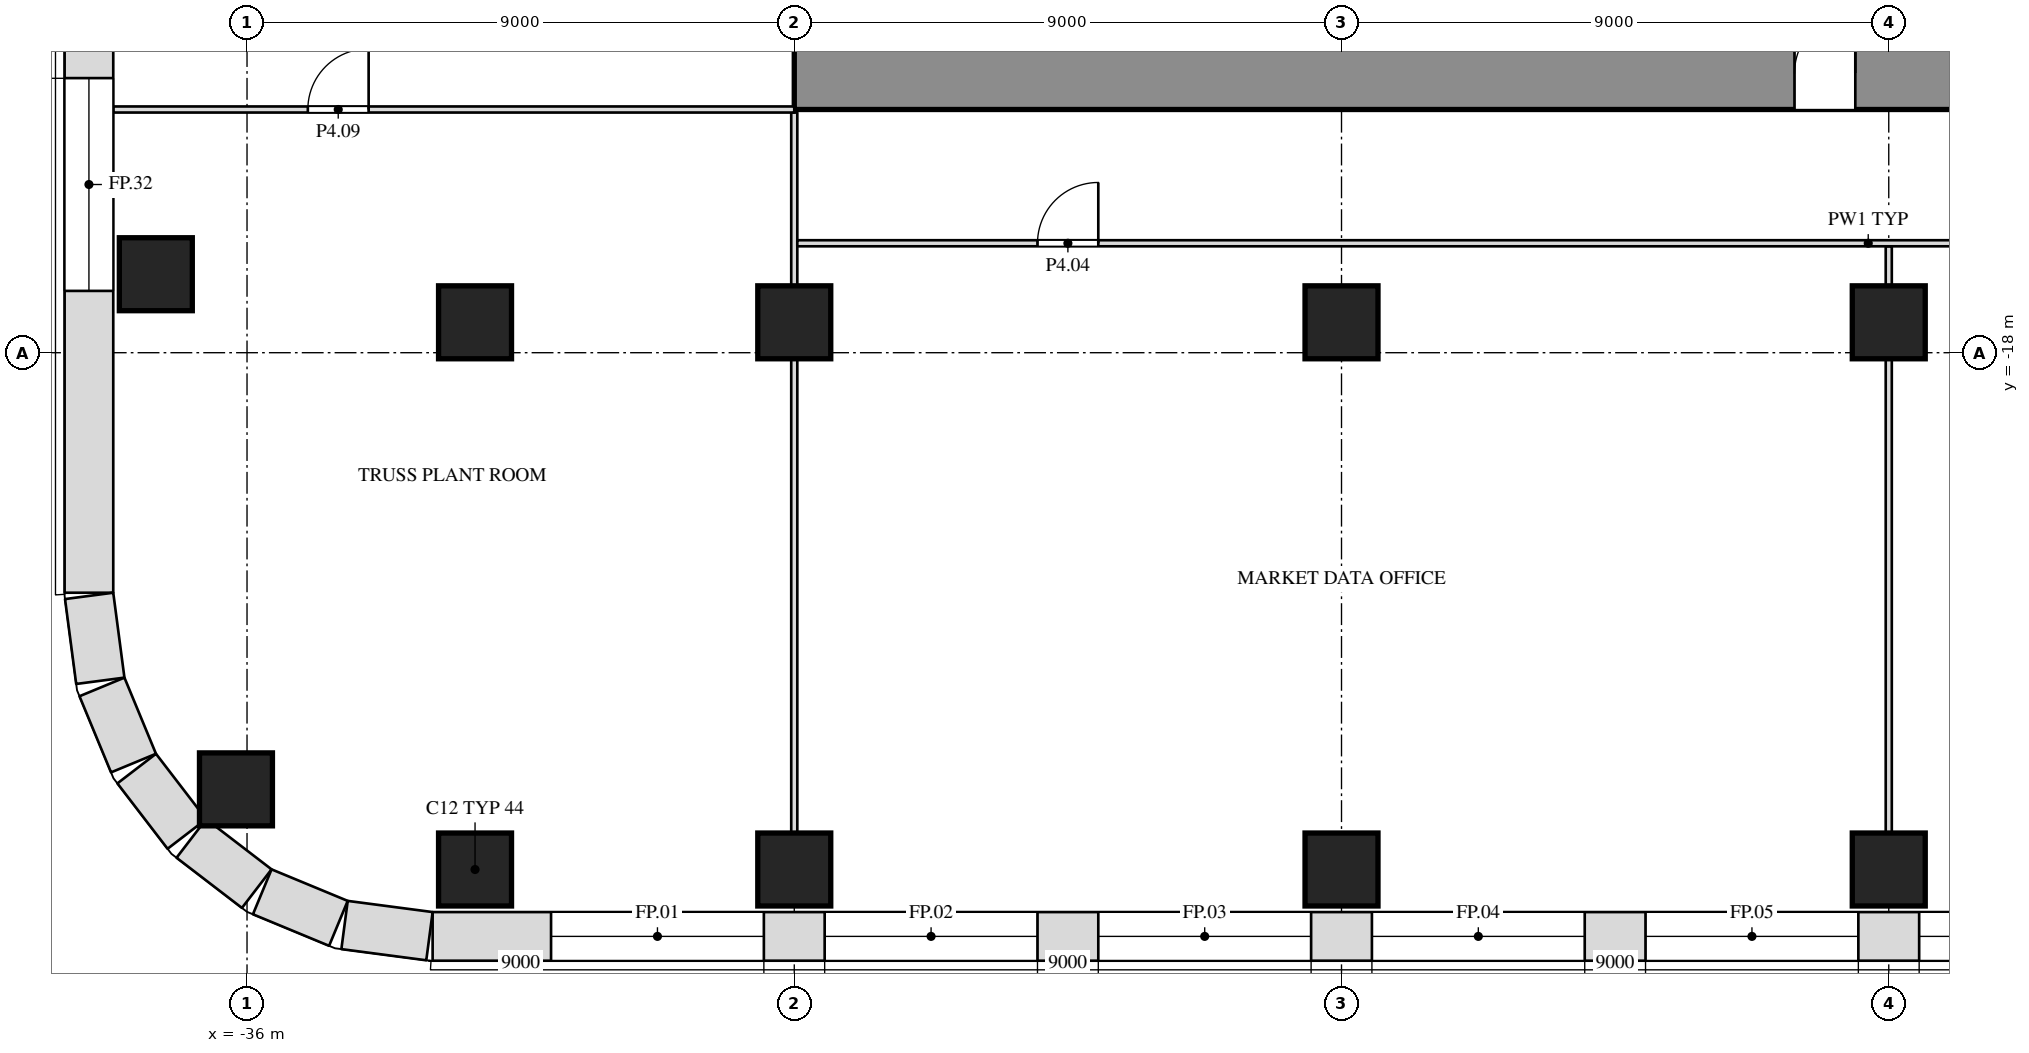
"""IFC4 building model, lengths in metres.
Left out: names, types, materials, properties, quantities, classifications, styles, units other than length and angle.
Written with IfcOpenShell. Run it as: python <this file> out.ifc"""

import sys

from ifc_helpers import new_model, si_unit, direction, frame, frame_2d, origin, origin_2d, place, context, subcontext, project, spatial, rectangle, extrude, element, fill, save


model = new_model("IFC4")
c1 = context("Model", 3, precision=1e-05, world=origin(), true_north=direction((0.0, 1.0)))
c2 = subcontext(c1, "Body", "Model", "MODEL_VIEW")
j1 = project(units=[si_unit("LENGTHUNIT", "METRE"), si_unit("PLANEANGLEUNIT", "RADIAN")], contexts=[c1])
p1 = place(None, origin())
s1 = spatial("IfcSite", under=j1, at=p1, CompositionType="ELEMENT")
p2 = place(p1, origin())
s2 = spatial("IfcBuilding", under=s1, at=p2, CompositionType="ELEMENT")
p3 = place(p2, frame((0.0, 0.0, 27.0)))
s3 = spatial("IfcBuildingStorey", under=s2, at=p3, CompositionType="ELEMENT", Elevation=27.0)
for number, where, z_axis, x_axis in (
    (1, (-32.25, -26.5, 0.0), (0.0, 0.0, 1.0), (1.0, 0.0, 0.0)),
    (2, (-27.0, -26.5, 0.0), (0.0, 0.0, 1.0), (1.0, 0.0, 0.0)),
    (3, (-18.0, -26.5, 0.0), (0.0, 0.0, 1.0), (1.0, 0.0, 0.0)),
    (4, (-9.0, -26.5, 0.0), (0.0, 0.0, 1.0), (1.0, 0.0, 0.0)),
    (5, (-36.182, -25.182, 0.0), (0.0, 0.0, 1.0), (1.0, 0.0, 0.0)),
    (6, (-32.25, -17.5, 0.0), (0.0, 0.0, 1.0), (1.0, 0.0, 0.0)),
    (7, (-27.0, -17.5, 0.0), (0.0, 0.0, 1.0), (1.0, 0.0, 0.0)),
    (8, (-18.0, -17.5, 0.0), (0.0, 0.0, 1.0), (1.0, 0.0, 0.0)),
    (9, (-9.0, -17.5, 0.0), (0.0, 0.0, 1.0), (1.0, 0.0, 0.0)),
    (10, (-37.5, -16.709, 0.0), (0.0, 0.0, 1.0), (1.0, 0.0, 0.0)),
):
    element("IfcColumn", number, at=place(p3, frame(where, z_axis=z_axis, x_axis=x_axis)), inside=s3, PredefinedType="COLUMN", context=c2, shape_type="SweptSolid", body=[
        extrude(rectangle(XDim=1.2, YDim=1.2, at=origin_2d()), origin(), (0.0, 0.0, 1.0), 6.0),
    ])
p4 = place(p3, frame((-27.0, -13.4, 0.0), z_axis=(0.0, 0.0, 1.0), x_axis=(1.0, 0.0, 0.0)))
e11 = element("IfcWall", 11, at=p4, inside=s3, PredefinedType="SHEAR", context=c2, shape_type="SweptSolid", body=[
    extrude(rectangle(XDim=54.0, YDim=1.2, at=frame_2d((27.0, 0.0))), origin(), (0.0, 0.0, 1.0), 5.7),
])
p5 = place(p4, frame((16.45, 0.0, 0.0)))
e12 = element("IfcOpeningElement", 12, at=p5, cuts=e11, PredefinedType="OPENING", context=c2, shape_type="SweptSolid", body=[
    extrude(rectangle(XDim=1.0, YDim=2.1, at=frame_2d((0.5, 1.05))), frame((0.0, 0.612, 0.0), z_axis=(0.0, -1.0, 0.0), x_axis=(1.0, 0.0, 0.0)), (0.0, 0.0, 1.0), 1.224),
])
p6 = place(p4, frame((36.55, 0.0, 0.0)))
e13 = element("IfcOpeningElement", 13, at=p6, cuts=e11, PredefinedType="OPENING", context=c2, shape_type="SweptSolid", body=[
    extrude(rectangle(XDim=1.0, YDim=2.1, at=frame_2d((0.5, 1.05))), frame((0.0, 0.612, 0.0), z_axis=(0.0, -1.0, 0.0), x_axis=(1.0, 0.0, 0.0)), (0.0, 0.0, 1.0), 1.224),
])
p7 = place(p3, frame((-27.0, -25.9, 0.0), z_axis=(0.0, 0.0, 1.0), x_axis=(0.0, 1.0, 0.0)))
e14 = element("IfcWall", 14, at=p7, inside=s3, PredefinedType="PARTITIONING", context=c2, shape_type="SweptSolid", body=[
    extrude(rectangle(XDim=7.8, YDim=0.1, at=frame_2d((3.9, 0.0))), origin(), (0.0, 0.0, 1.0), 5.088),
])
p8 = place(p3, frame((-27.0, -16.9, 0.0), z_axis=(0.0, 0.0, 1.0), x_axis=(0.0, 1.0, 0.0)))
e15 = element("IfcWall", 15, at=p8, inside=s3, PredefinedType="PARTITIONING", context=c2, shape_type="SweptSolid", body=[
    extrude(rectangle(XDim=2.85, YDim=0.1, at=frame_2d((1.425, 0.0))), origin(), (0.0, 0.0, 1.0), 5.088),
])
p9 = place(p3, frame((-9.0, -25.9, 0.0), z_axis=(0.0, 0.0, 1.0), x_axis=(0.0, 1.0, 0.0)))
e16 = element("IfcWall", 16, at=p9, inside=s3, PredefinedType="PARTITIONING", context=c2, shape_type="SweptSolid", body=[
    extrude(rectangle(XDim=7.8, YDim=0.1, at=frame_2d((3.9, 0.0))), origin(), (0.0, 0.0, 1.0), 5.088),
])
p10 = place(p3, frame((-9.0, -16.9, 0.0), z_axis=(0.0, 0.0, 1.0), x_axis=(0.0, 1.0, 0.0)))
e17 = element("IfcWall", 17, at=p10, inside=s3, PredefinedType="PARTITIONING", context=c2, shape_type="SweptSolid", body=[
    extrude(rectangle(XDim=0.65, YDim=0.1, at=frame_2d((0.325, 0.0))), origin(), (0.0, 0.0, 1.0), 5.7),
])
p11 = place(p3, frame((-26.95, -16.2, 0.0), z_axis=(0.0, 0.0, 1.0), x_axis=(1.0, 0.0, 0.0)))
e18 = element("IfcWall", 18, at=p11, inside=s3, PredefinedType="PARTITIONING", context=c2, shape_type="SweptSolid", body=[
    extrude(rectangle(XDim=35.225, YDim=0.1, at=frame_2d((17.612, 0.0))), origin(), (0.0, 0.0, 1.0), 5.7),
])
p12 = place(p11, frame((3.95, 0.0, 0.0)))
e19 = element("IfcOpeningElement", 19, at=p12, cuts=e18, PredefinedType="OPENING", context=c2, shape_type="SweptSolid", body=[
    extrude(rectangle(XDim=1.0, YDim=2.1, at=frame_2d((0.5, 1.05))), frame((0.0, 0.062, 0.0), z_axis=(0.0, -1.0, 0.0), x_axis=(1.0, 0.0, 0.0)), (0.0, 0.0, 1.0), 0.124),
])
p13 = place(p11, frame((21.95, 0.0, 0.0)))
e20 = element("IfcOpeningElement", 20, at=p13, cuts=e18, PredefinedType="OPENING", context=c2, shape_type="SweptSolid", body=[
    extrude(rectangle(XDim=1.0, YDim=2.1, at=frame_2d((0.5, 1.05))), frame((0.0, 0.062, 0.0), z_axis=(0.0, -1.0, 0.0), x_axis=(1.0, 0.0, 0.0)), (0.0, 0.0, 1.0), 0.124),
])
p14 = place(p11, frame((30.95, 0.0, 0.0)))
e21 = element("IfcOpeningElement", 21, at=p14, cuts=e18, PredefinedType="OPENING", context=c2, shape_type="SweptSolid", body=[
    extrude(rectangle(XDim=1.0, YDim=2.1, at=frame_2d((0.5, 1.05))), frame((0.0, 0.062, 0.0), z_axis=(0.0, -1.0, 0.0), x_axis=(1.0, 0.0, 0.0)), (0.0, 0.0, 1.0), 0.124),
])
p15 = place(p3, frame((-38.2, -14.0, 0.0), z_axis=(0.0, 0.0, 1.0), x_axis=(1.0, 0.0, 0.0)))
e22 = element("IfcWall", 22, at=p15, inside=s3, PredefinedType="PARTITIONING", context=c2, shape_type="SweptSolid", body=[
    extrude(rectangle(XDim=11.2, YDim=0.1, at=frame_2d((5.6, 0.0))), origin(), (0.0, 0.0, 1.0), 5.7),
])
p16 = place(p15, frame((3.2, 0.0, 0.0)))
e23 = element("IfcOpeningElement", 23, at=p16, cuts=e22, PredefinedType="OPENING", context=c2, shape_type="SweptSolid", body=[
    extrude(rectangle(XDim=1.0, YDim=2.1, at=frame_2d((0.5, 1.05))), frame((0.0, 0.062, 0.0), z_axis=(0.0, -1.0, 0.0), x_axis=(1.0, 0.0, 0.0)), (0.0, 0.0, 1.0), 0.124),
])
p17 = place(p3, frame((-32.948, -27.6, 0.0), z_axis=(0.0, 0.0, 1.0), x_axis=(1.0, 0.0, 0.0)))
e24 = element("IfcWall", 24, at=p17, inside=s3, PredefinedType="SOLIDWALL", context=c2, shape_type="SweptSolid", body=[
    extrude(rectangle(XDim=65.895, YDim=0.8, at=frame_2d((32.948, 0.0))), origin(), (0.0, 0.0, 1.0), 5.7),
])
p18 = place(p17, frame((1.948, 0.0, 1.0)))
e25 = element("IfcOpeningElement", 25, at=p18, cuts=e24, PredefinedType="OPENING", context=c2, shape_type="SweptSolid", body=[
    extrude(rectangle(XDim=3.5, YDim=4.0, at=frame_2d((1.75, 2.0))), frame((0.0, 0.412, 0.0), z_axis=(0.0, -1.0, 0.0), x_axis=(1.0, 0.0, 0.0)), (0.0, 0.0, 1.0), 0.824),
])
p19 = place(p17, frame((6.448, 0.0, 1.0)))
e26 = element("IfcOpeningElement", 26, at=p19, cuts=e24, PredefinedType="OPENING", context=c2, shape_type="SweptSolid", body=[
    extrude(rectangle(XDim=3.5, YDim=4.0, at=frame_2d((1.75, 2.0))), frame((0.0, 0.412, 0.0), z_axis=(0.0, -1.0, 0.0), x_axis=(1.0, 0.0, 0.0)), (0.0, 0.0, 1.0), 0.824),
])
p20 = place(p17, frame((10.948, 0.0, 1.0)))
e27 = element("IfcOpeningElement", 27, at=p20, cuts=e24, PredefinedType="OPENING", context=c2, shape_type="SweptSolid", body=[
    extrude(rectangle(XDim=3.5, YDim=4.0, at=frame_2d((1.75, 2.0))), frame((0.0, 0.412, 0.0), z_axis=(0.0, -1.0, 0.0), x_axis=(1.0, 0.0, 0.0)), (0.0, 0.0, 1.0), 0.824),
])
p21 = place(p17, frame((15.448, 0.0, 1.0)))
e28 = element("IfcOpeningElement", 28, at=p21, cuts=e24, PredefinedType="OPENING", context=c2, shape_type="SweptSolid", body=[
    extrude(rectangle(XDim=3.5, YDim=4.0, at=frame_2d((1.75, 2.0))), frame((0.0, 0.412, 0.0), z_axis=(0.0, -1.0, 0.0), x_axis=(1.0, 0.0, 0.0)), (0.0, 0.0, 1.0), 0.824),
])
p22 = place(p17, frame((19.948, 0.0, 1.0)))
e29 = element("IfcOpeningElement", 29, at=p22, cuts=e24, PredefinedType="OPENING", context=c2, shape_type="SweptSolid", body=[
    extrude(rectangle(XDim=3.5, YDim=4.0, at=frame_2d((1.75, 2.0))), frame((0.0, 0.412, 0.0), z_axis=(0.0, -1.0, 0.0), x_axis=(1.0, 0.0, 0.0)), (0.0, 0.0, 1.0), 0.824),
])
p23 = place(p17, frame((24.448, 0.0, 1.0)))
e30 = element("IfcOpeningElement", 30, at=p23, cuts=e24, PredefinedType="OPENING", context=c2, shape_type="SweptSolid", body=[
    extrude(rectangle(XDim=3.5, YDim=4.0, at=frame_2d((1.75, 2.0))), frame((0.0, 0.412, 0.0), z_axis=(0.0, -1.0, 0.0), x_axis=(1.0, 0.0, 0.0)), (0.0, 0.0, 1.0), 0.824),
])
p24 = place(p17, frame((28.948, 0.0, 1.0)))
e31 = element("IfcOpeningElement", 31, at=p24, cuts=e24, PredefinedType="OPENING", context=c2, shape_type="SweptSolid", body=[
    extrude(rectangle(XDim=3.5, YDim=4.0, at=frame_2d((1.75, 2.0))), frame((0.0, 0.412, 0.0), z_axis=(0.0, -1.0, 0.0), x_axis=(1.0, 0.0, 0.0)), (0.0, 0.0, 1.0), 0.824),
])
p25 = place(p17, frame((33.448, 0.0, 1.0)))
e32 = element("IfcOpeningElement", 32, at=p25, cuts=e24, PredefinedType="OPENING", context=c2, shape_type="SweptSolid", body=[
    extrude(rectangle(XDim=3.5, YDim=4.0, at=frame_2d((1.75, 2.0))), frame((0.0, 0.412, 0.0), z_axis=(0.0, -1.0, 0.0), x_axis=(1.0, 0.0, 0.0)), (0.0, 0.0, 1.0), 0.824),
])
p26 = place(p17, frame((37.948, 0.0, 1.0)))
e33 = element("IfcOpeningElement", 33, at=p26, cuts=e24, PredefinedType="OPENING", context=c2, shape_type="SweptSolid", body=[
    extrude(rectangle(XDim=3.5, YDim=4.0, at=frame_2d((1.75, 2.0))), frame((0.0, 0.412, 0.0), z_axis=(0.0, -1.0, 0.0), x_axis=(1.0, 0.0, 0.0)), (0.0, 0.0, 1.0), 0.824),
])
p27 = place(p17, frame((42.448, 0.0, 1.0)))
e34 = element("IfcOpeningElement", 34, at=p27, cuts=e24, PredefinedType="OPENING", context=c2, shape_type="SweptSolid", body=[
    extrude(rectangle(XDim=3.5, YDim=4.0, at=frame_2d((1.75, 2.0))), frame((0.0, 0.412, 0.0), z_axis=(0.0, -1.0, 0.0), x_axis=(1.0, 0.0, 0.0)), (0.0, 0.0, 1.0), 0.824),
])
p28 = place(p17, frame((46.948, 0.0, 1.0)))
e35 = element("IfcOpeningElement", 35, at=p28, cuts=e24, PredefinedType="OPENING", context=c2, shape_type="SweptSolid", body=[
    extrude(rectangle(XDim=3.5, YDim=4.0, at=frame_2d((1.75, 2.0))), frame((0.0, 0.412, 0.0), z_axis=(0.0, -1.0, 0.0), x_axis=(1.0, 0.0, 0.0)), (0.0, 0.0, 1.0), 0.824),
])
p29 = place(p17, frame((51.448, 0.0, 1.0)))
e36 = element("IfcOpeningElement", 36, at=p29, cuts=e24, PredefinedType="OPENING", context=c2, shape_type="SweptSolid", body=[
    extrude(rectangle(XDim=3.5, YDim=4.0, at=frame_2d((1.75, 2.0))), frame((0.0, 0.412, 0.0), z_axis=(0.0, -1.0, 0.0), x_axis=(1.0, 0.0, 0.0)), (0.0, 0.0, 1.0), 0.824),
])
p30 = place(p17, frame((55.948, 0.0, 1.0)))
e37 = element("IfcOpeningElement", 37, at=p30, cuts=e24, PredefinedType="OPENING", context=c2, shape_type="SweptSolid", body=[
    extrude(rectangle(XDim=3.5, YDim=4.0, at=frame_2d((1.75, 2.0))), frame((0.0, 0.412, 0.0), z_axis=(0.0, -1.0, 0.0), x_axis=(1.0, 0.0, 0.0)), (0.0, 0.0, 1.0), 0.824),
])
p31 = place(p17, frame((60.448, 0.0, 1.0)))
e38 = element("IfcOpeningElement", 38, at=p31, cuts=e24, PredefinedType="OPENING", context=c2, shape_type="SweptSolid", body=[
    extrude(rectangle(XDim=3.5, YDim=4.0, at=frame_2d((1.75, 2.0))), frame((0.0, 0.412, 0.0), z_axis=(0.0, -1.0, 0.0), x_axis=(1.0, 0.0, 0.0)), (0.0, 0.0, 1.0), 0.824),
])
p32 = place(p3, frame((-38.6, 13.948, 0.0), z_axis=(0.0, 0.0, 1.0), x_axis=(0.0, -1.0, 0.0)))
e39 = element("IfcWall", 39, at=p32, inside=s3, PredefinedType="SOLIDWALL", context=c2, shape_type="SweptSolid", body=[
    extrude(rectangle(XDim=35.895, YDim=0.8, at=frame_2d((17.948, 0.0))), origin(), (0.0, 0.0, 1.0), 5.7),
])
p33 = place(p32, frame((4.964, 0.0, 1.0)))
e40 = element("IfcOpeningElement", 40, at=p33, cuts=e39, PredefinedType="OPENING", context=c2, shape_type="SweptSolid", body=[
    extrude(rectangle(XDim=3.5, YDim=4.0, at=frame_2d((1.75, 2.0))), frame((0.0, 0.412, 0.0), z_axis=(0.0, -1.0, 0.0), x_axis=(1.0, 0.0, 0.0)), (0.0, 0.0, 1.0), 0.824),
])
p34 = place(p32, frame((9.458, 0.0, 1.0)))
e41 = element("IfcOpeningElement", 41, at=p34, cuts=e39, PredefinedType="OPENING", context=c2, shape_type="SweptSolid", body=[
    extrude(rectangle(XDim=3.5, YDim=4.0, at=frame_2d((1.75, 2.0))), frame((0.0, 0.412, 0.0), z_axis=(0.0, -1.0, 0.0), x_axis=(1.0, 0.0, 0.0)), (0.0, 0.0, 1.0), 0.824),
])
p35 = place(p32, frame((13.951, 0.0, 1.0)))
e42 = element("IfcOpeningElement", 42, at=p35, cuts=e39, PredefinedType="OPENING", context=c2, shape_type="SweptSolid", body=[
    extrude(rectangle(XDim=3.5, YDim=4.0, at=frame_2d((1.75, 2.0))), frame((0.0, 0.412, 0.0), z_axis=(0.0, -1.0, 0.0), x_axis=(1.0, 0.0, 0.0)), (0.0, 0.0, 1.0), 0.824),
])
p36 = place(p32, frame((18.444, 0.0, 1.0)))
e43 = element("IfcOpeningElement", 43, at=p36, cuts=e39, PredefinedType="OPENING", context=c2, shape_type="SweptSolid", body=[
    extrude(rectangle(XDim=3.5, YDim=4.0, at=frame_2d((1.75, 2.0))), frame((0.0, 0.412, 0.0), z_axis=(0.0, -1.0, 0.0), x_axis=(1.0, 0.0, 0.0)), (0.0, 0.0, 1.0), 0.824),
])
p37 = place(p32, frame((22.938, 0.0, 1.0)))
e44 = element("IfcOpeningElement", 44, at=p37, cuts=e39, PredefinedType="OPENING", context=c2, shape_type="SweptSolid", body=[
    extrude(rectangle(XDim=3.5, YDim=4.0, at=frame_2d((1.75, 2.0))), frame((0.0, 0.412, 0.0), z_axis=(0.0, -1.0, 0.0), x_axis=(1.0, 0.0, 0.0)), (0.0, 0.0, 1.0), 0.824),
])
p38 = place(p32, frame((27.431, 0.0, 1.0)))
e45 = element("IfcOpeningElement", 45, at=p38, cuts=e39, PredefinedType="OPENING", context=c2, shape_type="SweptSolid", body=[
    extrude(rectangle(XDim=3.5, YDim=4.0, at=frame_2d((1.75, 2.0))), frame((0.0, 0.412, 0.0), z_axis=(0.0, -1.0, 0.0), x_axis=(1.0, 0.0, 0.0)), (0.0, 0.0, 1.0), 0.824),
])
p39 = place(p3, frame((-38.597, -22.0, 0.0), z_axis=(0.0, 0.0, 1.0), x_axis=(0.130517283865, -0.99144603414, 0.0)))
e46 = element("IfcWall", 46, at=p39, inside=s3, PredefinedType="SOLIDWALL", context=c2, shape_type="SweptSolid", body=[
    extrude(rectangle(XDim=1.408, YDim=0.8, at=frame_2d((0.704, 0.0))), origin(), (0.0, 0.0, 1.0), 5.7),
])
p40 = place(p3, frame((-38.386, -23.497, 0.0), z_axis=(0.0, 0.0, 1.0), x_axis=(0.38276009378, -0.923847774587, 0.0)))
e47 = element("IfcWall", 47, at=p40, inside=s3, PredefinedType="SOLIDWALL", context=c2, shape_type="SweptSolid", body=[
    extrude(rectangle(XDim=1.355, YDim=0.8, at=frame_2d((0.678, 0.0))), origin(), (0.0, 0.0, 1.0), 5.7),
])
for number, where, z_axis, x_axis in (
    (48, (-37.815, -24.84, 0.0), (0.0, 0.0, 1.0), (0.609, -0.793, 0.0)),
    (49, (-36.916, -25.989, 0.0), (0.0, 0.0, 1.0), (0.793, -0.609, 0.0)),
):
    element("IfcWall", number, at=place(p3, frame(where, z_axis=z_axis, x_axis=x_axis)), inside=s3, PredefinedType="SOLIDWALL", context=c2, shape_type="SweptSolid", body=[
        extrude(rectangle(XDim=1.356, YDim=0.8, at=frame_2d((0.678, 0.0))), origin(), (0.0, 0.0, 1.0), 5.7),
    ])
p41 = place(p3, frame((-35.75, -26.867, 0.0), z_axis=(0.0, 0.0, 1.0), x_axis=(0.923847774587, -0.38276009378, 0.0)))
e50 = element("IfcWall", 50, at=p41, inside=s3, PredefinedType="SOLIDWALL", context=c2, shape_type="SweptSolid", body=[
    extrude(rectangle(XDim=1.355, YDim=0.8, at=frame_2d((0.678, 0.0))), origin(), (0.0, 0.0, 1.0), 5.7),
])
p42 = place(p3, frame((-34.396, -27.413, 0.0), z_axis=(0.0, 0.0, 1.0), x_axis=(0.99144603414, -0.130517283865, 0.0)))
e51 = element("IfcWall", 51, at=p42, inside=s3, PredefinedType="SOLIDWALL", context=c2, shape_type="SweptSolid", body=[
    extrude(rectangle(XDim=1.408, YDim=0.8, at=frame_2d((0.704, 0.0))), origin(), (0.0, 0.0, 1.0), 5.7),
])
p43 = place(p12, origin())
e52 = element("IfcDoor", 52, at=p43, inside=s3, OperationType="SINGLE_SWING_RIGHT", PredefinedType="DOOR", context=c2, shape_type="SweptSolid", body=[
    extrude(rectangle(XDim=1.0, YDim=2.1, at=frame_2d((0.5, 1.05))), frame((0.0, 0.025, 0.0), z_axis=(0.0, -1.0, 0.0), x_axis=(1.0, 0.0, 0.0)), (0.0, 0.0, 1.0), 0.05),
])
fill(e19, e52)
p44 = place(p16, origin())
e53 = element("IfcDoor", 53, at=p44, inside=s3, OperationType="SINGLE_SWING_RIGHT", PredefinedType="DOOR", context=c2, shape_type="SweptSolid", body=[
    extrude(rectangle(XDim=1.0, YDim=2.1, at=frame_2d((0.5, 1.05))), frame((0.0, 0.025, 0.0), z_axis=(0.0, -1.0, 0.0), x_axis=(1.0, 0.0, 0.0)), (0.0, 0.0, 1.0), 0.05),
])
fill(e23, e53)
p45 = place(p18, origin())
e54 = element("IfcWindow", 54, at=p45, inside=s3, PartitioningType="SINGLE_PANEL", PredefinedType="WINDOW", context=c2, shape_type="SweptSolid", body=[
    extrude(rectangle(XDim=3.5, YDim=4.0, at=frame_2d((1.75, 2.0))), frame((0.0, 0.03, 0.0), z_axis=(0.0, -1.0, 0.0), x_axis=(1.0, 0.0, 0.0)), (0.0, 0.0, 1.0), 0.06),
])
fill(e25, e54)
p46 = place(p19, origin())
e55 = element("IfcWindow", 55, at=p46, inside=s3, PartitioningType="SINGLE_PANEL", PredefinedType="WINDOW", context=c2, shape_type="SweptSolid", body=[
    extrude(rectangle(XDim=3.5, YDim=4.0, at=frame_2d((1.75, 2.0))), frame((0.0, 0.03, 0.0), z_axis=(0.0, -1.0, 0.0), x_axis=(1.0, 0.0, 0.0)), (0.0, 0.0, 1.0), 0.06),
])
fill(e26, e55)
p47 = place(p20, origin())
e56 = element("IfcWindow", 56, at=p47, inside=s3, PartitioningType="SINGLE_PANEL", PredefinedType="WINDOW", context=c2, shape_type="SweptSolid", body=[
    extrude(rectangle(XDim=3.5, YDim=4.0, at=frame_2d((1.75, 2.0))), frame((0.0, 0.03, 0.0), z_axis=(0.0, -1.0, 0.0), x_axis=(1.0, 0.0, 0.0)), (0.0, 0.0, 1.0), 0.06),
])
fill(e27, e56)
p48 = place(p21, origin())
e57 = element("IfcWindow", 57, at=p48, inside=s3, PartitioningType="SINGLE_PANEL", PredefinedType="WINDOW", context=c2, shape_type="SweptSolid", body=[
    extrude(rectangle(XDim=3.5, YDim=4.0, at=frame_2d((1.75, 2.0))), frame((0.0, 0.03, 0.0), z_axis=(0.0, -1.0, 0.0), x_axis=(1.0, 0.0, 0.0)), (0.0, 0.0, 1.0), 0.06),
])
fill(e28, e57)
p49 = place(p22, origin())
e58 = element("IfcWindow", 58, at=p49, inside=s3, PartitioningType="SINGLE_PANEL", PredefinedType="WINDOW", context=c2, shape_type="SweptSolid", body=[
    extrude(rectangle(XDim=3.5, YDim=4.0, at=frame_2d((1.75, 2.0))), frame((0.0, 0.03, 0.0), z_axis=(0.0, -1.0, 0.0), x_axis=(1.0, 0.0, 0.0)), (0.0, 0.0, 1.0), 0.06),
])
fill(e29, e58)
p50 = place(p23, origin())
e59 = element("IfcWindow", 59, at=p50, inside=s3, PartitioningType="SINGLE_PANEL", PredefinedType="WINDOW", context=c2, shape_type="SweptSolid", body=[
    extrude(rectangle(XDim=3.5, YDim=4.0, at=frame_2d((1.75, 2.0))), frame((0.0, 0.03, 0.0), z_axis=(0.0, -1.0, 0.0), x_axis=(1.0, 0.0, 0.0)), (0.0, 0.0, 1.0), 0.06),
])
fill(e30, e59)
p51 = place(p38, origin())
e60 = element("IfcWindow", 60, at=p51, inside=s3, PartitioningType="SINGLE_PANEL", PredefinedType="WINDOW", context=c2, shape_type="SweptSolid", body=[
    extrude(rectangle(XDim=3.5, YDim=4.0, at=frame_2d((1.75, 2.0))), frame((0.0, 0.03, 0.0), z_axis=(0.0, -1.0, 0.0), x_axis=(1.0, 0.0, 0.0)), (0.0, 0.0, 1.0), 0.06),
])
fill(e45, e60)
p52 = place(p5, origin())
e61 = element("IfcDoor", 61, at=p52, inside=s3, OperationType="SINGLE_SWING_RIGHT", PredefinedType="DOOR", context=c2, shape_type="SweptSolid", body=[
    extrude(rectangle(XDim=1.0, YDim=2.1, at=frame_2d((0.5, 1.05))), frame((0.0, 0.025, 0.0), z_axis=(0.0, -1.0, 0.0), x_axis=(1.0, 0.0, 0.0)), (0.0, 0.0, 1.0), 0.05),
])
fill(e12, e61)
save(model, sys.argv[1])
